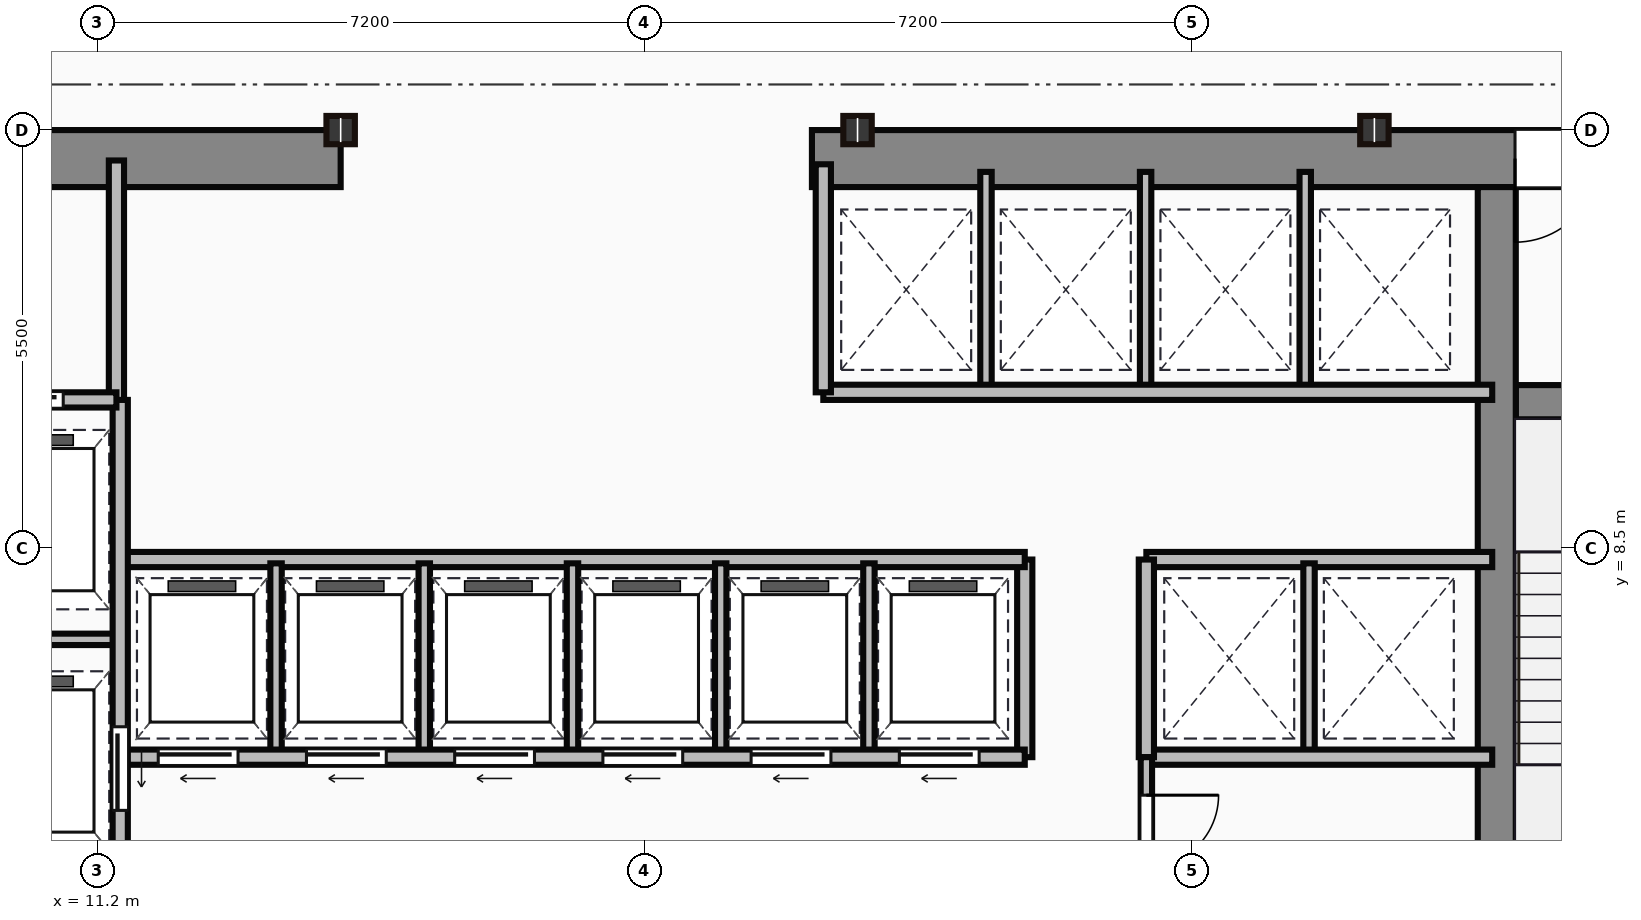
"""IFC4 building model, lengths in metres.
Left out: names, types, materials, properties, quantities, classifications, styles, units other than length and angle.
Written with IfcOpenShell. Run it as: python <this file> out.ifc"""

import sys

from ifc_helpers import new_model, si_unit, direction, frame, frame_2d, origin, origin_2d, place, context, subcontext, project, spatial, rectangle, i_section, extrude, source, transform, mapped, element, fill, save


model = new_model("IFC4")
c1 = context("Model", 3, precision=1e-05, world=origin(), true_north=direction((0.0, 1.0)))
c2 = subcontext(c1, "Body", "Model", "MODEL_VIEW")
j1 = project(units=[si_unit("LENGTHUNIT", "METRE"), si_unit("PLANEANGLEUNIT", "RADIAN")], contexts=[c1])
p1 = place(None, origin())
s1 = spatial("IfcSite", under=j1, at=p1, CompositionType="ELEMENT")
p2 = place(p1, origin())
s2 = spatial("IfcBuilding", under=s1, at=p2, CompositionType="ELEMENT")
p3 = place(p2, frame((0.0, 0.0, 144.25)))
s3 = spatial("IfcBuildingStorey", under=s2, at=p3, CompositionType="ELEMENT", Elevation=144.25)
m1 = source(origin(), c2, "Body", "SweptSolid", [
    extrude(rectangle(XDim=9.1, YDim=0.75, at=frame_2d((4.55, 0.0))), origin(), (0.0, 0.0, 1.0), 3.65),
])
p4 = place(p3, frame((5.3, 13.625, 0.0), z_axis=(0.0, 0.0, 1.0), x_axis=(1.0, 0.0, 0.0)))
e1 = element("IfcWall", 1, at=p4, inside=s3, PredefinedType="SHEAR", context=c2, shape_type="MappedRepresentation", body=[
    mapped(m1, transform((0.0, 0.0, 0.0))),
])
p5 = place(p4, frame((4.1, 0.0, 0.0)))
e2 = element("IfcOpeningElement", 2, at=p5, cuts=e1, PredefinedType="OPENING", context=c2, shape_type="SweptSolid", body=[
    extrude(rectangle(XDim=1.1, YDim=2.15, at=frame_2d((0.55, 1.075))), frame((0.0, 0.385, 0.0), z_axis=(0.0, -1.0, 0.0), x_axis=(1.0, 0.0, 0.0)), (0.0, 0.0, 1.0), 0.77),
])
m2 = source(origin(), c2, "Body", "SweptSolid", [
    extrude(rectangle(XDim=12.6, YDim=0.75, at=frame_2d((6.3, 0.0))), origin(), (0.0, 0.0, 1.0), 3.65),
])
p6 = place(p3, frame((20.6, 13.625, 0.0), z_axis=(0.0, 0.0, 1.0), x_axis=(1.0, 0.0, 0.0)))
e3 = element("IfcWall", 3, at=p6, inside=s3, PredefinedType="SHEAR", context=c2, shape_type="MappedRepresentation", body=[
    mapped(m2, transform((0.0, 0.0, 0.0))),
])
p7 = place(p6, frame((9.25, 0.0, 0.0)))
e4 = element("IfcOpeningElement", 4, at=p7, cuts=e3, PredefinedType="OPENING", context=c2, shape_type="SweptSolid", body=[
    extrude(rectangle(XDim=1.1, YDim=2.15, at=frame_2d((0.55, 1.075))), frame((0.0, 0.385, 0.0), z_axis=(0.0, -1.0, 0.0), x_axis=(1.0, 0.0, 0.0)), (0.0, 0.0, 1.0), 0.77),
])
m3 = source(origin(), c2, "Body", "SweptSolid", [
    extrude(rectangle(XDim=12.35, YDim=0.5, at=frame_2d((6.175, 0.0))), origin(), (0.0, 0.0, 1.0), 3.65),
])
p8 = place(p3, frame((29.61, 0.9, 0.0), z_axis=(0.0, 0.0, 1.0), x_axis=(0.0, 1.0, 0.0)))
e5 = element("IfcWall", 5, at=p8, inside=s3, PredefinedType="SHEAR", context=c2, shape_type="MappedRepresentation", body=[
    mapped(m3, transform((0.0, 0.0, 0.0))),
])
m4 = source(origin(), c2, "Body", "SweptSolid", [
    extrude(rectangle(XDim=3.39, YDim=0.45, at=frame_2d((1.695, 0.0))), origin(), (0.0, 0.0, 1.0), 3.65),
])
p9 = place(p3, frame((29.86, 10.42, 0.0), z_axis=(0.0, 0.0, 1.0), x_axis=(1.0, 0.0, 0.0)))
e6 = element("IfcWall", 6, at=p9, inside=s3, PredefinedType="SHEAR", context=c2, shape_type="MappedRepresentation", body=[
    mapped(m4, transform((0.0, 0.0, 0.0))),
])
p10 = place(p9, frame((1.1, 0.0, 0.0)))
e7 = element("IfcOpeningElement", 7, at=p10, cuts=e6, PredefinedType="OPENING", context=c2, shape_type="SweptSolid", body=[
    extrude(rectangle(XDim=1.1, YDim=2.15, at=frame_2d((0.55, 1.075))), frame((0.0, 0.235, 0.0), z_axis=(0.0, -1.0, 0.0), x_axis=(1.0, 0.0, 0.0)), (0.0, 0.0, 1.0), 0.47),
])
m5 = source(origin(), c2, "Body", "SweptSolid", [
    extrude(i_section(OverallWidth=0.374, OverallDepth=0.372, WebThickness=0.016, FlangeThickness=0.026, at=origin_2d()), origin(), (0.0, 0.0, 1.0), 3.65),
])
for number, where, z_axis, x_axis in (
    (8, (14.4, 14.0, 0.0), (0.0, 0.0, 1.0), (1.0, 0.0, 0.0)),
    (9, (21.2, 14.0, 0.0), (0.0, 0.0, 1.0), (1.0, 0.0, 0.0)),
    (10, (28.0, 14.0, 0.0), (0.0, 0.0, 1.0), (1.0, 0.0, 0.0)),
):
    element("IfcColumn", number, at=place(p3, frame(where, z_axis=z_axis, x_axis=x_axis)), inside=s3, PredefinedType="COLUMN", context=c2, shape_type="MappedRepresentation", body=[
        mapped(m5, transform((0.0, 0.0, 0.0))),
    ])
m6 = source(origin(), c2, "Body", "SweptSolid", [
    extrude(rectangle(XDim=3.18, YDim=0.2, at=frame_2d((1.59, 0.0))), origin(), (0.0, 0.0, 1.0), 3.4),
])
p11 = place(p3, frame((11.45, 10.42, 0.0), z_axis=(0.0, 0.0, 1.0), x_axis=(0.0, 1.0, 0.0)))
e11 = element("IfcWall", 11, at=p11, inside=s3, PredefinedType="PARTITIONING", context=c2, shape_type="MappedRepresentation", body=[
    mapped(m6, transform((0.0, 0.0, 0.0))),
])
m7 = source(origin(), c2, "Body", "SweptSolid", [
    extrude(rectangle(XDim=2.35, YDim=0.2, at=frame_2d((1.175, 0.0))), origin(), (0.0, 0.0, 1.0), 3.4),
])
p12 = place(p3, frame((9.1, 10.45, 0.0), z_axis=(0.0, 0.0, 1.0), x_axis=(1.0, 0.0, 0.0)))
e12 = element("IfcWall", 12, at=p12, inside=s3, PredefinedType="PARTITIONING", context=c2, shape_type="MappedRepresentation", body=[
    mapped(m7, transform((0.0, 0.0, 0.0))),
])
p13 = place(p12, frame((0.55, 0.0, 0.0)))
e13 = element("IfcOpeningElement", 13, at=p13, cuts=e12, PredefinedType="OPENING", context=c2, shape_type="SweptSolid", body=[
    extrude(rectangle(XDim=1.1, YDim=2.15, at=frame_2d((0.55, 1.075))), frame((0.0, 0.11, 0.0), z_axis=(0.0, -1.0, 0.0), x_axis=(1.0, 0.0, 0.0)), (0.0, 0.0, 1.0), 0.22),
])
m8 = source(origin(), c2, "Body", "SweptSolid", [
    extrude(rectangle(XDim=9.6, YDim=0.2, at=frame_2d((4.8, 0.0))), origin(), (0.0, 0.0, 1.0), 3.4),
])
p14 = place(p3, frame((11.5, 0.85, 0.0), z_axis=(0.0, 0.0, 1.0), x_axis=(0.0, 1.0, 0.0)))
e14 = element("IfcWall", 14, at=p14, inside=s3, PredefinedType="PARTITIONING", context=c2, shape_type="MappedRepresentation", body=[
    mapped(m8, transform((0.0, 0.0, 0.0))),
])
p15 = place(p14, frame((4.2, 0.0, 0.0)))
e15 = element("IfcOpeningElement", 15, at=p15, cuts=e14, PredefinedType="OPENING", context=c2, shape_type="SweptSolid", body=[
    extrude(rectangle(XDim=1.1, YDim=2.15, at=frame_2d((0.55, 1.075))), frame((0.0, 0.11, 0.0), z_axis=(0.0, -1.0, 0.0), x_axis=(1.0, 0.0, 0.0)), (0.0, 0.0, 1.0), 0.22),
])
p16 = place(p14, frame((0.9, 0.0, 0.0)))
e16 = element("IfcOpeningElement", 16, at=p16, cuts=e14, PredefinedType="OPENING", context=c2, shape_type="SweptSolid", body=[
    extrude(rectangle(XDim=1.2, YDim=2.15, at=frame_2d((0.6, 1.075))), frame((0.0, 0.11, 0.0), z_axis=(0.0, -1.0, 0.0), x_axis=(1.0, 0.0, 0.0)), (0.0, 0.0, 1.0), 0.22),
])
m9 = source(origin(), c2, "Body", "SweptSolid", [
    extrude(rectangle(XDim=2.4, YDim=0.15, at=frame_2d((1.2, 0.0))), origin(), (0.0, 0.0, 1.0), 3.4),
])
p17 = place(p3, frame((9.1, 7.3, 0.0), z_axis=(0.0, 0.0, 1.0), x_axis=(1.0, 0.0, 0.0)))
e17 = element("IfcWall", 17, at=p17, inside=s3, PredefinedType="PARTITIONING", context=c2, shape_type="MappedRepresentation", body=[
    mapped(m9, transform((0.0, 0.0, 0.0))),
])
m10 = source(origin(), c2, "Body", "SweptSolid", [
    extrude(rectangle(XDim=11.85, YDim=0.2, at=frame_2d((5.925, 0.0))), origin(), (0.0, 0.0, 1.0), 3.4),
])
p18 = place(p3, frame((11.55, 5.75, 0.0), z_axis=(0.0, 0.0, 1.0), x_axis=(1.0, 0.0, 0.0)))
e18 = element("IfcWall", 18, at=p18, inside=s3, PredefinedType="PARTITIONING", context=c2, shape_type="MappedRepresentation", body=[
    mapped(m10, transform((0.0, 0.0, 0.0))),
])
p19 = place(p18, frame((0.45, 0.0, 0.0)))
e19 = element("IfcOpeningElement", 19, at=p19, cuts=e18, PredefinedType="OPENING", context=c2, shape_type="SweptSolid", body=[
    extrude(rectangle(XDim=1.05, YDim=2.15, at=frame_2d((0.525, 1.075))), frame((0.0, 0.11, 0.0), z_axis=(0.0, -1.0, 0.0), x_axis=(1.0, 0.0, 0.0)), (0.0, 0.0, 1.0), 0.22),
])
p20 = place(p18, frame((2.4, 0.0, 0.0)))
e20 = element("IfcOpeningElement", 20, at=p20, cuts=e18, PredefinedType="OPENING", context=c2, shape_type="SweptSolid", body=[
    extrude(rectangle(XDim=1.05, YDim=2.15, at=frame_2d((0.525, 1.075))), frame((0.0, 0.11, 0.0), z_axis=(0.0, -1.0, 0.0), x_axis=(1.0, 0.0, 0.0)), (0.0, 0.0, 1.0), 0.22),
])
p21 = place(p18, frame((4.35, 0.0, 0.0)))
e21 = element("IfcOpeningElement", 21, at=p21, cuts=e18, PredefinedType="OPENING", context=c2, shape_type="SweptSolid", body=[
    extrude(rectangle(XDim=1.05, YDim=2.15, at=frame_2d((0.525, 1.075))), frame((0.0, 0.11, 0.0), z_axis=(0.0, -1.0, 0.0), x_axis=(1.0, 0.0, 0.0)), (0.0, 0.0, 1.0), 0.22),
])
p22 = place(p18, frame((6.3, 0.0, 0.0)))
e22 = element("IfcOpeningElement", 22, at=p22, cuts=e18, PredefinedType="OPENING", context=c2, shape_type="SweptSolid", body=[
    extrude(rectangle(XDim=1.05, YDim=2.15, at=frame_2d((0.525, 1.075))), frame((0.0, 0.11, 0.0), z_axis=(0.0, -1.0, 0.0), x_axis=(1.0, 0.0, 0.0)), (0.0, 0.0, 1.0), 0.22),
])
p23 = place(p18, frame((8.25, 0.0, 0.0)))
e23 = element("IfcOpeningElement", 23, at=p23, cuts=e18, PredefinedType="OPENING", context=c2, shape_type="SweptSolid", body=[
    extrude(rectangle(XDim=1.05, YDim=2.15, at=frame_2d((0.525, 1.075))), frame((0.0, 0.11, 0.0), z_axis=(0.0, -1.0, 0.0), x_axis=(1.0, 0.0, 0.0)), (0.0, 0.0, 1.0), 0.22),
])
p24 = place(p18, frame((10.2, 0.0, 0.0)))
e24 = element("IfcOpeningElement", 24, at=p24, cuts=e18, PredefinedType="OPENING", context=c2, shape_type="SweptSolid", body=[
    extrude(rectangle(XDim=1.05, YDim=2.15, at=frame_2d((0.525, 1.075))), frame((0.0, 0.11, 0.0), z_axis=(0.0, -1.0, 0.0), x_axis=(1.0, 0.0, 0.0)), (0.0, 0.0, 1.0), 0.22),
])
p25 = place(p3, frame((11.55, 8.35, 0.0), z_axis=(0.0, 0.0, 1.0), x_axis=(1.0, 0.0, 0.0)))
e25 = element("IfcWall", 25, at=p25, inside=s3, PredefinedType="PARTITIONING", context=c2, shape_type="MappedRepresentation", body=[
    mapped(m10, transform((0.0, 0.0, 0.0))),
])
m11 = source(origin(), c2, "Body", "SweptSolid", [
    extrude(rectangle(XDim=2.6, YDim=0.2, at=frame_2d((1.3, 0.0))), origin(), (0.0, 0.0, 1.0), 3.4),
])
p26 = place(p3, frame((23.4, 5.75, 0.0), z_axis=(0.0, 0.0, 1.0), x_axis=(0.0, 1.0, 0.0)))
e26 = element("IfcWall", 26, at=p26, inside=s3, PredefinedType="PARTITIONING", context=c2, shape_type="MappedRepresentation", body=[
    mapped(m11, transform((0.0, 0.0, 0.0))),
])
m12 = source(origin(), c2, "Body", "SweptSolid", [
    extrude(rectangle(XDim=2.5, YDim=0.15, at=frame_2d((1.25, 0.0))), origin(), (0.0, 0.0, 1.0), 3.4),
])
for number, where, z_axis, x_axis in (
    (27, (13.55, 5.8, 0.0), (0.0, 0.0, 1.0), (0.0, 1.0, 0.0)),
    (28, (15.5, 5.8, 0.0), (0.0, 0.0, 1.0), (0.0, 1.0, 0.0)),
    (29, (17.45, 5.8, 0.0), (0.0, 0.0, 1.0), (0.0, 1.0, 0.0)),
    (30, (19.4, 5.8, 0.0), (0.0, 0.0, 1.0), (0.0, 1.0, 0.0)),
    (31, (21.35, 5.8, 0.0), (0.0, 0.0, 1.0), (0.0, 1.0, 0.0)),
):
    element("IfcWall", number, at=place(p3, frame(where, z_axis=z_axis, x_axis=x_axis)), inside=s3, PredefinedType="PARTITIONING", context=c2, shape_type="MappedRepresentation", body=[
        mapped(m12, transform((0.0, 0.0, 0.0))),
    ])
m13 = source(origin(), c2, "Body", "SweptSolid", [
    extrude(rectangle(XDim=8.8, YDim=0.2, at=frame_2d((4.4, 0.0))), origin(), (0.0, 0.0, 1.0), 3.4),
])
p27 = place(p3, frame((20.75, 10.55, 0.0), z_axis=(0.0, 0.0, 1.0), x_axis=(1.0, 0.0, 0.0)))
e32 = element("IfcWall", 32, at=p27, inside=s3, PredefinedType="PARTITIONING", context=c2, shape_type="MappedRepresentation", body=[
    mapped(m13, transform((0.0, 0.0, 0.0))),
])
m14 = source(origin(), c2, "Body", "SweptSolid", [
    extrude(rectangle(XDim=3.0, YDim=0.2, at=frame_2d((1.5, 0.0))), origin(), (0.0, 0.0, 1.0), 3.4),
])
p28 = place(p3, frame((20.75, 10.55, 0.0), z_axis=(0.0, 0.0, 1.0), x_axis=(0.0, 1.0, 0.0)))
e33 = element("IfcWall", 33, at=p28, inside=s3, PredefinedType="PARTITIONING", context=c2, shape_type="MappedRepresentation", body=[
    mapped(m14, transform((0.0, 0.0, 0.0))),
])
m15 = source(origin(), c2, "Body", "SweptSolid", [
    extrude(rectangle(XDim=2.85, YDim=0.15, at=frame_2d((1.425, 0.0))), origin(), (0.0, 0.0, 1.0), 3.4),
])
for number, where, z_axis, x_axis in (
    (34, (22.89, 10.6, 0.0), (0.0, 0.0, 1.0), (0.0, 1.0, 0.0)),
    (35, (24.99, 10.6, 0.0), (0.0, 0.0, 1.0), (0.0, 1.0, 0.0)),
    (36, (27.09, 10.6, 0.0), (0.0, 0.0, 1.0), (0.0, 1.0, 0.0)),
):
    element("IfcWall", number, at=place(p3, frame(where, z_axis=z_axis, x_axis=x_axis)), inside=s3, PredefinedType="PARTITIONING", context=c2, shape_type="MappedRepresentation", body=[
        mapped(m15, transform((0.0, 0.0, 0.0))),
    ])
m16 = source(origin(), c2, "Body", "SweptSolid", [
    extrude(rectangle(XDim=4.55, YDim=0.2, at=frame_2d((2.275, 0.0))), origin(), (0.0, 0.0, 1.0), 3.4),
])
for number, where, z_axis, x_axis in (
    (37, (25.0, 8.35, 0.0), (0.0, 0.0, 1.0), (1.0, 0.0, 0.0)),
    (38, (25.0, 5.75, 0.0), (0.0, 0.0, 1.0), (1.0, 0.0, 0.0)),
):
    element("IfcWall", number, at=place(p3, frame(where, z_axis=z_axis, x_axis=x_axis)), inside=s3, PredefinedType="PARTITIONING", context=c2, shape_type="MappedRepresentation", body=[
        mapped(m16, transform((0.0, 0.0, 0.0))),
    ])
p29 = place(p3, frame((25.0, 5.75, 0.0), z_axis=(0.0, 0.0, 1.0), x_axis=(0.0, 1.0, 0.0)))
e39 = element("IfcWall", 39, at=p29, inside=s3, PredefinedType="PARTITIONING", context=c2, shape_type="MappedRepresentation", body=[
    mapped(m11, transform((0.0, 0.0, 0.0))),
])
p30 = place(p3, frame((27.14, 5.8, 0.0), z_axis=(0.0, 0.0, 1.0), x_axis=(0.0, 1.0, 0.0)))
e40 = element("IfcWall", 40, at=p30, inside=s3, PredefinedType="PARTITIONING", context=c2, shape_type="MappedRepresentation", body=[
    mapped(m12, transform((0.0, 0.0, 0.0))),
])
m17 = source(origin(), c2, "Body", "SweptSolid", [
    extrude(rectangle(XDim=4.9, YDim=0.15, at=frame_2d((2.45, 0.0))), origin(), (0.0, 0.0, 1.0), 3.4),
])
p31 = place(p3, frame((25.0, 0.85, 0.0), z_axis=(0.0, 0.0, 1.0), x_axis=(0.0, 1.0, 0.0)))
e41 = element("IfcWall", 41, at=p31, inside=s3, PredefinedType="PARTITIONING", context=c2, shape_type="MappedRepresentation", body=[
    mapped(m17, transform((0.0, 0.0, 0.0))),
])
p32 = place(p31, frame((1.8, 0.0, 0.0)))
e42 = element("IfcOpeningElement", 42, at=p32, cuts=e41, PredefinedType="OPENING", context=c2, shape_type="SweptSolid", body=[
    extrude(rectangle(XDim=0.95, YDim=2.15, at=frame_2d((0.475, 1.075))), frame((0.0, 0.085, 0.0), z_axis=(0.0, -1.0, 0.0), x_axis=(1.0, 0.0, 0.0)), (0.0, 0.0, 1.0), 0.17),
])
p33 = place(p31, frame((3.45, 0.0, 0.0)))
e43 = element("IfcOpeningElement", 43, at=p33, cuts=e41, PredefinedType="OPENING", context=c2, shape_type="SweptSolid", body=[
    extrude(rectangle(XDim=0.95, YDim=2.15, at=frame_2d((0.475, 1.075))), frame((0.0, 0.085, 0.0), z_axis=(0.0, -1.0, 0.0), x_axis=(1.0, 0.0, 0.0)), (0.0, 0.0, 1.0), 0.17),
])
m18 = source(origin(), c2, "Body", "SweptSolid", [
    extrude(rectangle(XDim=1.1, YDim=2.15, at=frame_2d((0.55, 1.075))), frame((0.0, 0.025, 0.0), z_axis=(0.0, -1.0, 0.0), x_axis=(1.0, 0.0, 0.0)), (0.0, 0.0, 1.0), 0.05),
])
p34 = place(p7, origin())
e44 = element("IfcDoor", 44, at=p34, inside=s3, OperationType="SINGLE_SWING_LEFT", PredefinedType="DOOR", context=c2, shape_type="MappedRepresentation", body=[
    mapped(m18, transform((0.0, 0.0, 0.0))),
])
fill(e4, e44)
p35 = place(p13, origin())
e45 = element("IfcDoor", 45, at=p35, inside=s3, OperationType="SLIDING_TO_LEFT", PredefinedType="DOOR", context=c2, shape_type="MappedRepresentation", body=[
    mapped(m18, transform((0.0, 0.0, 0.0))),
])
fill(e13, e45)
p36 = place(p15, frame((1.1, 0.0, 0.0), z_axis=(0.0, 0.0, 1.0), x_axis=(-1.0, 0.0, 0.0)))
e46 = element("IfcDoor", 46, at=p36, inside=s3, OperationType="SLIDING_TO_LEFT", PredefinedType="DOOR", context=c2, shape_type="MappedRepresentation", body=[
    mapped(m18, transform((0.0, 0.0, 0.0))),
])
fill(e15, e46)
m19 = source(origin(), c2, "Body", "SweptSolid", [
    extrude(rectangle(XDim=1.05, YDim=2.15, at=frame_2d((0.525, 1.075))), frame((0.0, 0.025, 0.0), z_axis=(0.0, -1.0, 0.0), x_axis=(1.0, 0.0, 0.0)), (0.0, 0.0, 1.0), 0.05),
])
p37 = place(p19, frame((1.05, 0.0, 0.0), z_axis=(0.0, 0.0, 1.0), x_axis=(-1.0, 0.0, 0.0)))
e47 = element("IfcDoor", 47, at=p37, inside=s3, OperationType="SLIDING_TO_LEFT", PredefinedType="DOOR", context=c2, shape_type="MappedRepresentation", body=[
    mapped(m19, transform((0.0, 0.0, 0.0))),
])
fill(e19, e47)
p38 = place(p20, frame((1.05, 0.0, 0.0), z_axis=(0.0, 0.0, 1.0), x_axis=(-1.0, 0.0, 0.0)))
e48 = element("IfcDoor", 48, at=p38, inside=s3, OperationType="SLIDING_TO_LEFT", PredefinedType="DOOR", context=c2, shape_type="MappedRepresentation", body=[
    mapped(m19, transform((0.0, 0.0, 0.0))),
])
fill(e20, e48)
p39 = place(p21, frame((1.05, 0.0, 0.0), z_axis=(0.0, 0.0, 1.0), x_axis=(-1.0, 0.0, 0.0)))
e49 = element("IfcDoor", 49, at=p39, inside=s3, OperationType="SLIDING_TO_LEFT", PredefinedType="DOOR", context=c2, shape_type="MappedRepresentation", body=[
    mapped(m19, transform((0.0, 0.0, 0.0))),
])
fill(e21, e49)
p40 = place(p22, frame((1.05, 0.0, 0.0), z_axis=(0.0, 0.0, 1.0), x_axis=(-1.0, 0.0, 0.0)))
e50 = element("IfcDoor", 50, at=p40, inside=s3, OperationType="SLIDING_TO_LEFT", PredefinedType="DOOR", context=c2, shape_type="MappedRepresentation", body=[
    mapped(m19, transform((0.0, 0.0, 0.0))),
])
fill(e22, e50)
p41 = place(p23, frame((1.05, 0.0, 0.0), z_axis=(0.0, 0.0, 1.0), x_axis=(-1.0, 0.0, 0.0)))
e51 = element("IfcDoor", 51, at=p41, inside=s3, OperationType="SLIDING_TO_LEFT", PredefinedType="DOOR", context=c2, shape_type="MappedRepresentation", body=[
    mapped(m19, transform((0.0, 0.0, 0.0))),
])
fill(e23, e51)
p42 = place(p24, frame((1.05, 0.0, 0.0), z_axis=(0.0, 0.0, 1.0), x_axis=(-1.0, 0.0, 0.0)))
e52 = element("IfcDoor", 52, at=p42, inside=s3, OperationType="SLIDING_TO_LEFT", PredefinedType="DOOR", context=c2, shape_type="MappedRepresentation", body=[
    mapped(m19, transform((0.0, 0.0, 0.0))),
])
fill(e24, e52)
m20 = source(origin(), c2, "Body", "SweptSolid", [
    extrude(rectangle(XDim=0.95, YDim=2.15, at=frame_2d((0.475, 1.075))), frame((0.0, 0.025, 0.0), z_axis=(0.0, -1.0, 0.0), x_axis=(1.0, 0.0, 0.0)), (0.0, 0.0, 1.0), 0.05),
])
p43 = place(p33, origin())
e53 = element("IfcDoor", 53, at=p43, inside=s3, OperationType="SINGLE_SWING_RIGHT", PredefinedType="DOOR", context=c2, shape_type="MappedRepresentation", body=[
    mapped(m20, transform((0.0, 0.0, 0.0))),
])
fill(e43, e53)
save(model, sys.argv[1])
